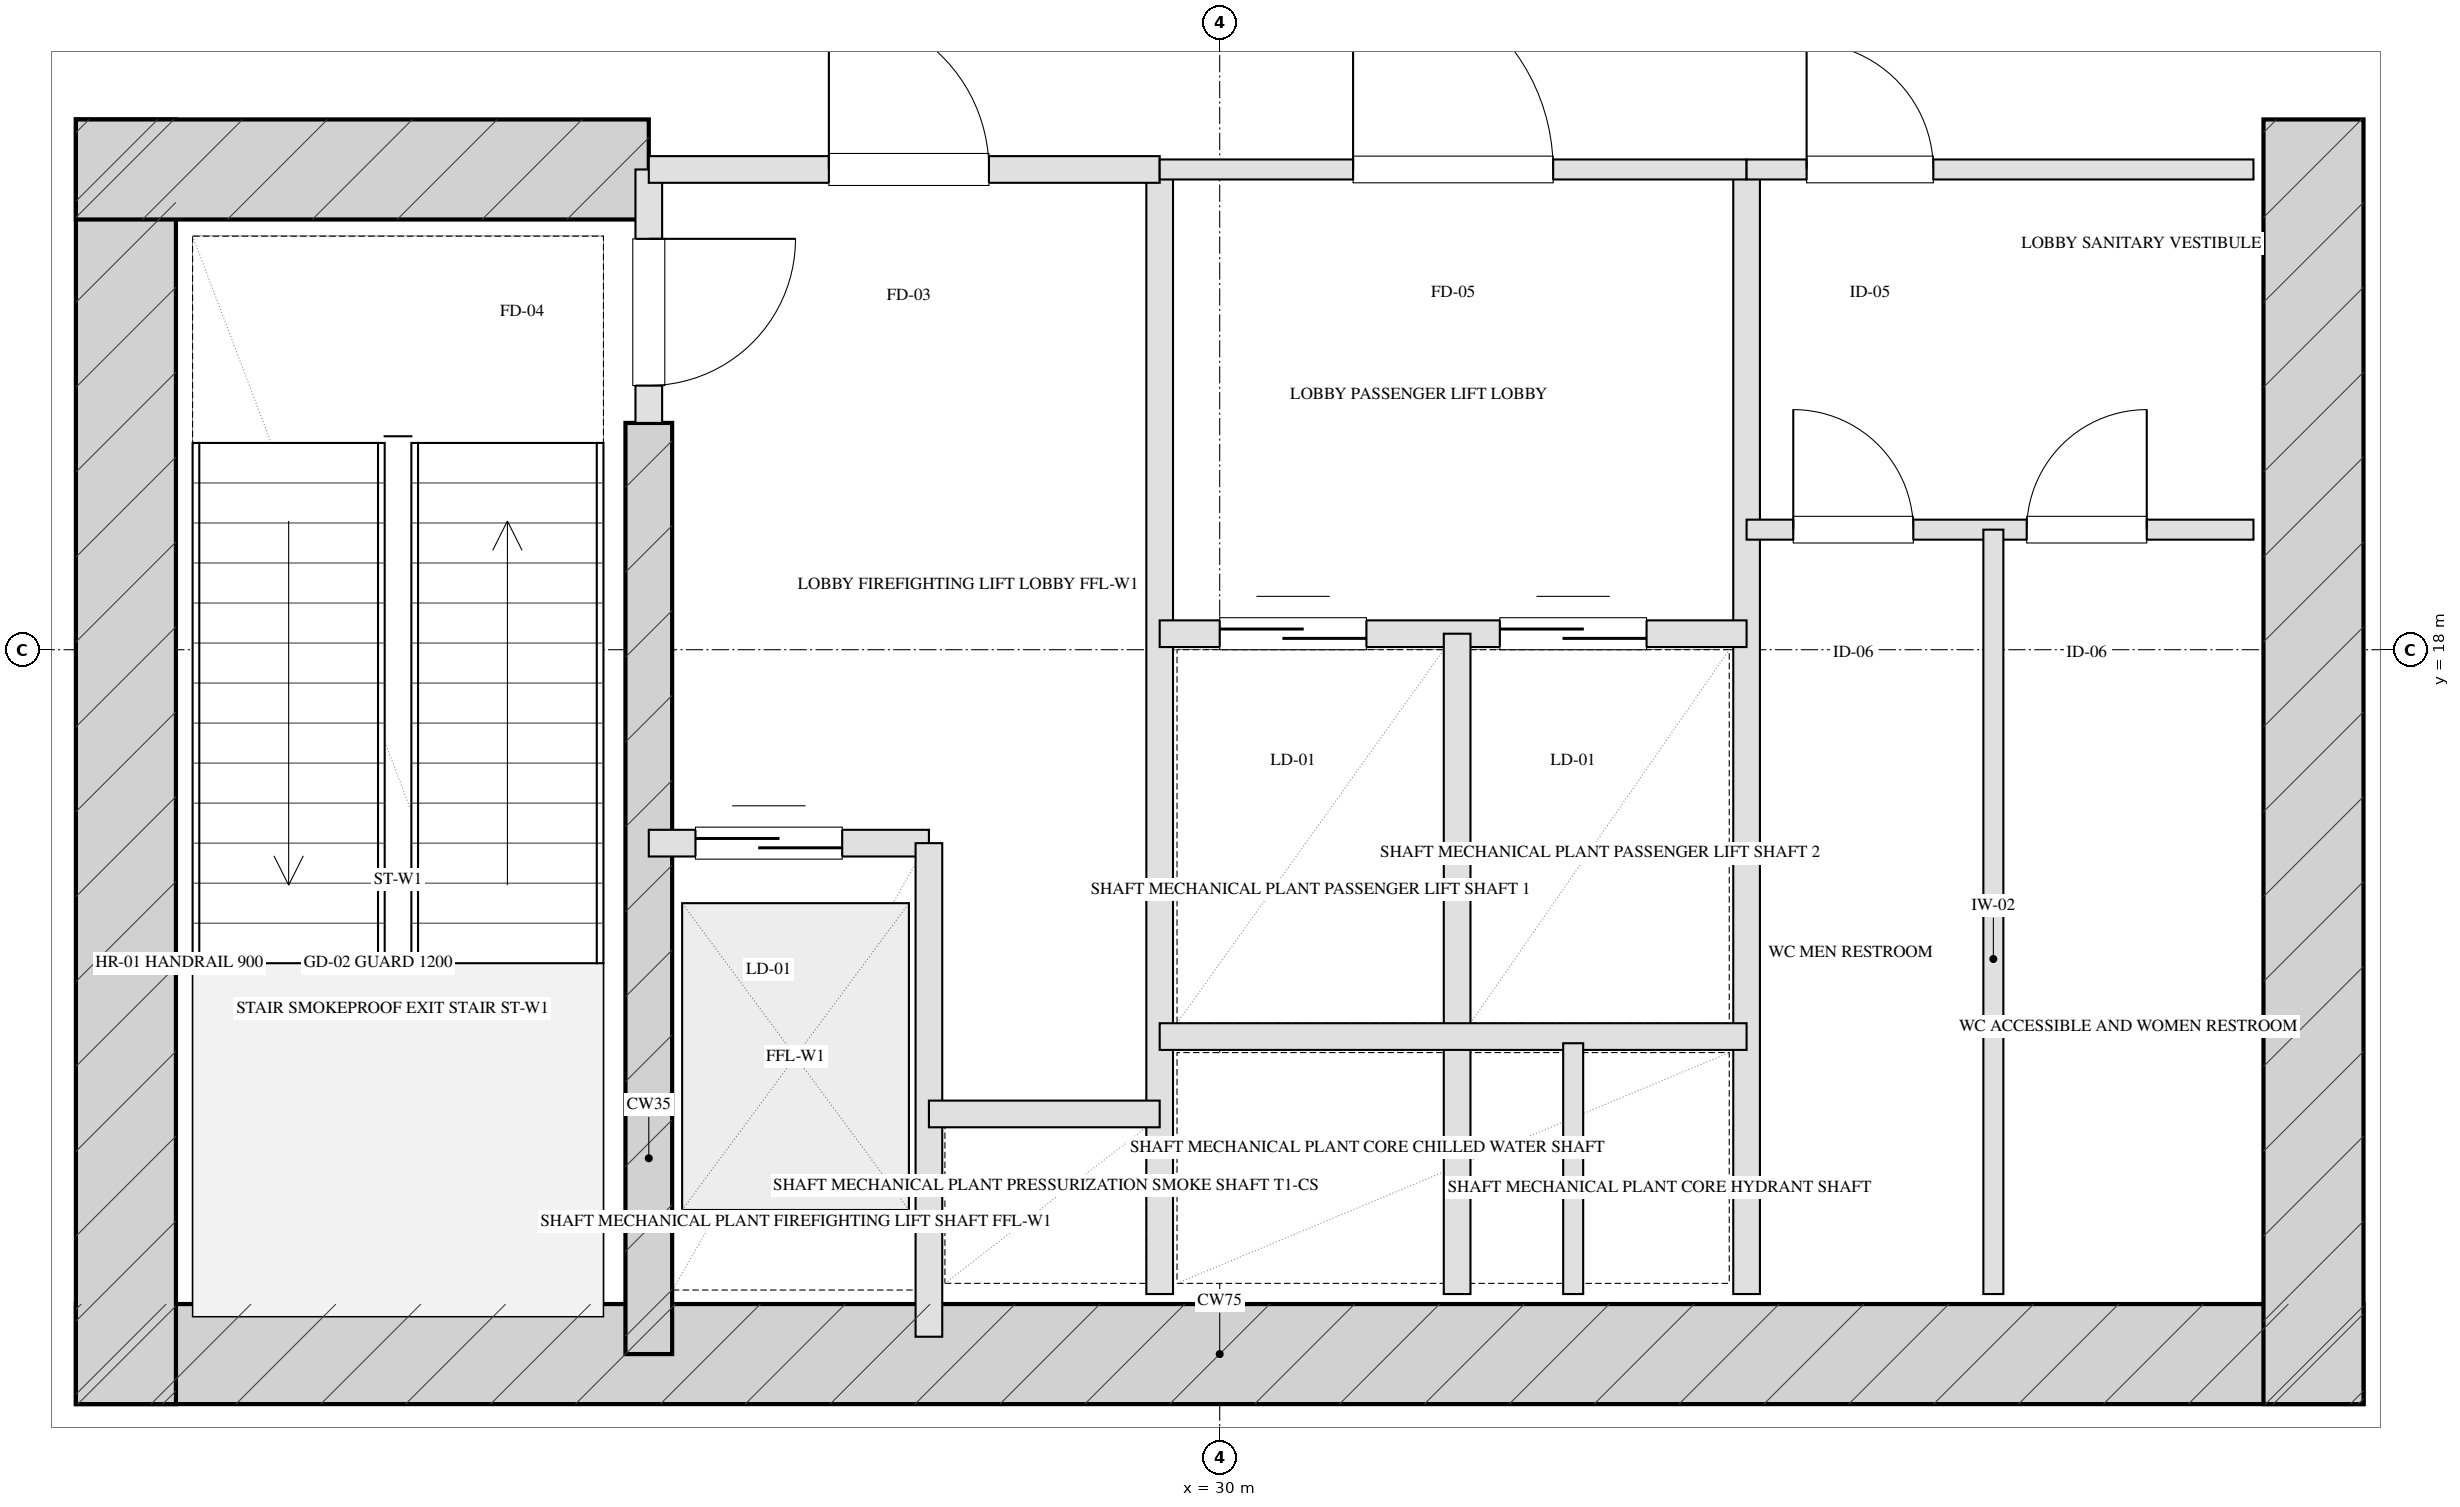
"""IFC4 building model, lengths in metres.
Left out: names, types, materials, properties, quantities, classifications, styles, units other than length and angle.
Written with IfcOpenShell. Run it as: python <this file> out.ifc"""

import sys

from ifc_helpers import new_model, si_unit, direction, frame, frame_2d, origin, place, context, subcontext, project, spatial, rectangle, extrude, element, fill, save


model = new_model("IFC4")
c1 = context("Model", 3, precision=1e-05, world=origin(), true_north=direction((0.0, 1.0)))
c2 = subcontext(c1, "Body", "Model", "MODEL_VIEW")
j1 = project(units=[si_unit("LENGTHUNIT", "METRE"), si_unit("PLANEANGLEUNIT", "RADIAN")], contexts=[c1])
p1 = place(None, origin())
s1 = spatial("IfcSite", under=j1, at=p1, CompositionType="ELEMENT")
p2 = place(p1, origin())
s2 = spatial("IfcBuilding", under=s1, at=p2, CompositionType="ELEMENT")
p3 = place(p2, frame((0.0, 0.0, 92.0)))
s3 = spatial("IfcBuildingStorey", under=s2, at=p3, CompositionType="ELEMENT", Elevation=92.0)
p4 = place(p3, frame((21.425, 12.72, 0.0), z_axis=(0.0, 0.0, 1.0), x_axis=(1.0, 0.0, 0.0)))
e1 = element("IfcWall", 1, at=p4, inside=s3, PredefinedType="SHEAR", context=c2, shape_type="SweptSolid", body=[
    extrude(rectangle(XDim=17.15, YDim=0.75, at=frame_2d((8.575, 0.0))), origin(), (0.0, 0.0, 1.0), 4.6),
])
for number, where, z_axis, x_axis in (
    (2, (21.8, 21.975, 0.0), (0.0, 0.0, 1.0), (0.0, -1.0, 0.0)),
    (3, (38.2, 21.975, 0.0), (0.0, 0.0, 1.0), (0.0, -1.0, 0.0)),
):
    element("IfcWall", number, at=place(p3, frame(where, z_axis=z_axis, x_axis=x_axis)), inside=s3, PredefinedType="SHEAR", context=c2, shape_type="SweptSolid", body=[
        extrude(rectangle(XDim=9.63, YDim=0.75, at=frame_2d((4.815, 0.0))), origin(), (0.0, 0.0, 1.0), 4.6),
    ])
p5 = place(p3, frame((25.72, 19.7, 0.0), z_axis=(0.0, 0.0, 1.0), x_axis=(0.0, -1.0, 0.0)))
e4 = element("IfcWall", 4, at=p5, inside=s3, PredefinedType="SHEAR", context=c2, shape_type="SweptSolid", body=[
    extrude(rectangle(XDim=6.98, YDim=0.35, at=frame_2d((3.49, 0.0))), origin(), (0.0, 0.0, 1.0), 4.6),
])
p6 = place(p3, frame((21.425, 21.6, 0.0), z_axis=(0.0, 0.0, 1.0), x_axis=(1.0, 0.0, 0.0)))
e5 = element("IfcWall", 5, at=p6, inside=s3, PredefinedType="SHEAR", context=c2, shape_type="SweptSolid", body=[
    extrude(rectangle(XDim=4.295, YDim=0.75, at=frame_2d((2.147, 0.0))), origin(), (0.0, 0.0, 1.0), 4.6),
])
p7 = place(p3, frame((25.72, 21.6, 0.0), z_axis=(0.0, 0.0, 1.0), x_axis=(0.0, -1.0, 0.0)))
e6 = element("IfcWall", 6, at=p7, inside=s3, PredefinedType="PARTITIONING", context=c2, shape_type="SweptSolid", body=[
    extrude(rectangle(XDim=1.9, YDim=0.2, at=frame_2d((0.95, 0.0))), origin(), (0.0, 0.0, 1.0), 4.305),
])
p8 = place(p7, frame((0.52, 0.0, 0.0)))
e7 = element("IfcOpeningElement", 7, at=p8, cuts=e6, PredefinedType="OPENING", context=c2, shape_type="SweptSolid", body=[
    extrude(rectangle(XDim=1.1, YDim=2.05, at=frame_2d((0.55, 1.025))), frame((0.0, 0.11, 0.0), z_axis=(0.0, -1.0, 0.0), x_axis=(1.0, 0.0, 0.0)), (0.0, 0.0, 1.0), 0.22),
])
p9 = place(p3, frame((29.55, 21.6, 0.0), z_axis=(0.0, 0.0, 1.0), x_axis=(0.0, -1.0, 0.0)))
e8 = element("IfcWall", 8, at=p9, inside=s3, PredefinedType="PARTITIONING", context=c2, shape_type="SweptSolid", body=[
    extrude(rectangle(XDim=8.43, YDim=0.2, at=frame_2d((4.215, 0.0))), origin(), (0.0, 0.0, 1.0), 4.305),
])
p10 = place(p3, frame((25.72, 21.6, 0.0), z_axis=(0.0, 0.0, 1.0), x_axis=(1.0, 0.0, 0.0)))
e9 = element("IfcWall", 9, at=p10, inside=s3, PredefinedType="PARTITIONING", context=c2, shape_type="SweptSolid", body=[
    extrude(rectangle(XDim=3.83, YDim=0.2, at=frame_2d((1.915, 0.0))), origin(), (0.0, 0.0, 1.0), 4.305),
])
p11 = place(p10, frame((1.35, 0.0, 0.0)))
e10 = element("IfcOpeningElement", 10, at=p11, cuts=e9, PredefinedType="OPENING", context=c2, shape_type="SweptSolid", body=[
    extrude(rectangle(XDim=1.2, YDim=2.05, at=frame_2d((0.6, 1.025))), frame((0.0, 0.11, 0.0), z_axis=(0.0, -1.0, 0.0), x_axis=(1.0, 0.0, 0.0)), (0.0, 0.0, 1.0), 0.22),
])
p12 = place(p3, frame((25.72, 16.55, 0.0), z_axis=(0.0, 0.0, 1.0), x_axis=(1.0, 0.0, 0.0)))
e11 = element("IfcWall", 11, at=p12, inside=s3, PredefinedType="PARTITIONING", context=c2, shape_type="SweptSolid", body=[
    extrude(rectangle(XDim=2.1, YDim=0.2, at=frame_2d((1.05, 0.0))), origin(), (0.0, 0.0, 1.0), 4.305),
])
p13 = place(p12, frame((0.35, 0.0, 0.0)))
e12 = element("IfcOpeningElement", 12, at=p13, cuts=e11, PredefinedType="OPENING", context=c2, shape_type="SweptSolid", body=[
    extrude(rectangle(XDim=1.1, YDim=2.05, at=frame_2d((0.55, 1.025))), frame((0.0, 0.11, 0.0), z_axis=(0.0, -1.0, 0.0), x_axis=(1.0, 0.0, 0.0)), (0.0, 0.0, 1.0), 0.22),
])
p14 = place(p3, frame((27.82, 16.55, 0.0), z_axis=(0.0, 0.0, 1.0), x_axis=(0.0, -1.0, 0.0)))
e13 = element("IfcWall", 13, at=p14, inside=s3, PredefinedType="PARTITIONING", context=c2, shape_type="SweptSolid", body=[
    extrude(rectangle(XDim=3.7, YDim=0.2, at=frame_2d((1.85, 0.0))), origin(), (0.0, 0.0, 1.0), 4.305),
])
p15 = place(p3, frame((27.82, 14.52, 0.0), z_axis=(0.0, 0.0, 1.0), x_axis=(1.0, 0.0, 0.0)))
e14 = element("IfcWall", 14, at=p15, inside=s3, PredefinedType="PARTITIONING", context=c2, shape_type="SweptSolid", body=[
    extrude(rectangle(XDim=1.73, YDim=0.2, at=frame_2d((0.865, 0.0))), origin(), (0.0, 0.0, 1.0), 4.305),
])
p16 = place(p3, frame((33.95, 21.6, 0.0), z_axis=(0.0, 0.0, 1.0), x_axis=(0.0, -1.0, 0.0)))
e15 = element("IfcWall", 15, at=p16, inside=s3, PredefinedType="PARTITIONING", context=c2, shape_type="SweptSolid", body=[
    extrude(rectangle(XDim=8.43, YDim=0.2, at=frame_2d((4.215, 0.0))), origin(), (0.0, 0.0, 1.0), 4.305),
])
p17 = place(p3, frame((29.55, 21.6, 0.0), z_axis=(0.0, 0.0, 1.0), x_axis=(1.0, 0.0, 0.0)))
e16 = element("IfcWall", 16, at=p17, inside=s3, PredefinedType="PARTITIONING", context=c2, shape_type="SweptSolid", body=[
    extrude(rectangle(XDim=4.4, YDim=0.15, at=frame_2d((2.2, 0.0))), origin(), (0.0, 0.0, 1.0), 4.305),
])
p18 = place(p17, frame((1.45, 0.0, 0.0)))
e17 = element("IfcOpeningElement", 17, at=p18, cuts=e16, PredefinedType="OPENING", context=c2, shape_type="SweptSolid", body=[
    extrude(rectangle(XDim=1.5, YDim=2.05, at=frame_2d((0.75, 1.025))), frame((0.0, 0.085, 0.0), z_axis=(0.0, -1.0, 0.0), x_axis=(1.0, 0.0, 0.0)), (0.0, 0.0, 1.0), 0.17),
])
p19 = place(p3, frame((29.55, 18.12, 0.0), z_axis=(0.0, 0.0, 1.0), x_axis=(1.0, 0.0, 0.0)))
e18 = element("IfcWall", 18, at=p19, inside=s3, PredefinedType="PARTITIONING", context=c2, shape_type="SweptSolid", body=[
    extrude(rectangle(XDim=4.4, YDim=0.2, at=frame_2d((2.2, 0.0))), origin(), (0.0, 0.0, 1.0), 4.305),
])
p20 = place(p19, frame((0.45, 0.0, 0.0)))
e19 = element("IfcOpeningElement", 19, at=p20, cuts=e18, PredefinedType="OPENING", context=c2, shape_type="SweptSolid", body=[
    extrude(rectangle(XDim=1.1, YDim=2.05, at=frame_2d((0.55, 1.025))), frame((0.0, 0.11, 0.0), z_axis=(0.0, -1.0, 0.0), x_axis=(1.0, 0.0, 0.0)), (0.0, 0.0, 1.0), 0.22),
])
p21 = place(p19, frame((2.55, 0.0, 0.0)))
e20 = element("IfcOpeningElement", 20, at=p21, cuts=e18, PredefinedType="OPENING", context=c2, shape_type="SweptSolid", body=[
    extrude(rectangle(XDim=1.1, YDim=2.05, at=frame_2d((0.55, 1.025))), frame((0.0, 0.11, 0.0), z_axis=(0.0, -1.0, 0.0), x_axis=(1.0, 0.0, 0.0)), (0.0, 0.0, 1.0), 0.22),
])
p22 = place(p3, frame((31.78, 18.12, 0.0), z_axis=(0.0, 0.0, 1.0), x_axis=(0.0, -1.0, 0.0)))
e21 = element("IfcWall", 21, at=p22, inside=s3, PredefinedType="PARTITIONING", context=c2, shape_type="SweptSolid", body=[
    extrude(rectangle(XDim=4.95, YDim=0.2, at=frame_2d((2.475, 0.0))), origin(), (0.0, 0.0, 1.0), 4.305),
])
p23 = place(p3, frame((29.55, 15.1, 0.0), z_axis=(0.0, 0.0, 1.0), x_axis=(1.0, 0.0, 0.0)))
e22 = element("IfcWall", 22, at=p23, inside=s3, PredefinedType="PARTITIONING", context=c2, shape_type="SweptSolid", body=[
    extrude(rectangle(XDim=4.4, YDim=0.2, at=frame_2d((2.2, 0.0))), origin(), (0.0, 0.0, 1.0), 4.305),
])
p24 = place(p3, frame((32.65, 15.05, 0.0), z_axis=(0.0, 0.0, 1.0), x_axis=(0.0, -1.0, 0.0)))
e23 = element("IfcWall", 23, at=p24, inside=s3, PredefinedType="PARTITIONING", context=c2, shape_type="SweptSolid", body=[
    extrude(rectangle(XDim=1.88, YDim=0.15, at=frame_2d((0.94, 0.0))), origin(), (0.0, 0.0, 1.0), 4.305),
])
p25 = place(p3, frame((33.95, 21.6, 0.0), z_axis=(0.0, 0.0, 1.0), x_axis=(1.0, 0.0, 0.0)))
e24 = element("IfcWall", 24, at=p25, inside=s3, PredefinedType="PARTITIONING", context=c2, shape_type="SweptSolid", body=[
    extrude(rectangle(XDim=3.8, YDim=0.15, at=frame_2d((1.9, 0.0))), origin(), (0.0, 0.0, 1.0), 4.305),
])
p26 = place(p25, frame((0.45, 0.0, 0.0)))
e25 = element("IfcOpeningElement", 25, at=p26, cuts=e24, PredefinedType="OPENING", context=c2, shape_type="SweptSolid", body=[
    extrude(rectangle(XDim=0.95, YDim=2.05, at=frame_2d((0.475, 1.025))), frame((0.0, 0.085, 0.0), z_axis=(0.0, -1.0, 0.0), x_axis=(1.0, 0.0, 0.0)), (0.0, 0.0, 1.0), 0.17),
])
p27 = place(p3, frame((33.95, 18.9, 0.0), z_axis=(0.0, 0.0, 1.0), x_axis=(1.0, 0.0, 0.0)))
e26 = element("IfcWall", 26, at=p27, inside=s3, PredefinedType="PARTITIONING", context=c2, shape_type="SweptSolid", body=[
    extrude(rectangle(XDim=3.8, YDim=0.15, at=frame_2d((1.9, 0.0))), origin(), (0.0, 0.0, 1.0), 4.305),
])
p28 = place(p27, frame((0.35, 0.0, 0.0)))
e27 = element("IfcOpeningElement", 27, at=p28, cuts=e26, PredefinedType="OPENING", context=c2, shape_type="SweptSolid", body=[
    extrude(rectangle(XDim=0.9, YDim=2.05, at=frame_2d((0.45, 1.025))), frame((0.0, 0.085, 0.0), z_axis=(0.0, -1.0, 0.0), x_axis=(1.0, 0.0, 0.0)), (0.0, 0.0, 1.0), 0.17),
])
p29 = place(p27, frame((2.1, 0.0, 0.0)))
e28 = element("IfcOpeningElement", 28, at=p29, cuts=e26, PredefinedType="OPENING", context=c2, shape_type="SweptSolid", body=[
    extrude(rectangle(XDim=0.9, YDim=2.05, at=frame_2d((0.45, 1.025))), frame((0.0, 0.085, 0.0), z_axis=(0.0, -1.0, 0.0), x_axis=(1.0, 0.0, 0.0)), (0.0, 0.0, 1.0), 0.17),
])
p30 = place(p3, frame((35.8, 18.9, 0.0), z_axis=(0.0, 0.0, 1.0), x_axis=(0.0, -1.0, 0.0)))
e29 = element("IfcWall", 29, at=p30, inside=s3, PredefinedType="PARTITIONING", context=c2, shape_type="SweptSolid", body=[
    extrude(rectangle(XDim=5.73, YDim=0.15, at=frame_2d((2.865, 0.0))), origin(), (0.0, 0.0, 1.0), 4.305),
])
p31 = place(p8, origin())
e30 = element("IfcDoor", 30, at=p31, inside=s3, OperationType="SINGLE_SWING_LEFT", PredefinedType="DOOR", context=c2, shape_type="SweptSolid", body=[
    extrude(rectangle(XDim=1.1, YDim=2.05, at=frame_2d((0.55, 1.025))), frame((0.0, 0.025, 0.0), z_axis=(0.0, -1.0, 0.0), x_axis=(1.0, 0.0, 0.0)), (0.0, 0.0, 1.0), 0.05),
])
fill(e7, e30)
p32 = place(p11, origin())
e31 = element("IfcDoor", 31, at=p32, inside=s3, OperationType="SINGLE_SWING_LEFT", PredefinedType="DOOR", context=c2, shape_type="SweptSolid", body=[
    extrude(rectangle(XDim=1.2, YDim=2.05, at=frame_2d((0.6, 1.025))), frame((0.0, 0.025, 0.0), z_axis=(0.0, -1.0, 0.0), x_axis=(1.0, 0.0, 0.0)), (0.0, 0.0, 1.0), 0.05),
])
fill(e10, e31)
p33 = place(p13, origin())
e32 = element("IfcDoor", 32, at=p33, inside=s3, OperationType="DOUBLE_DOOR_SLIDING", PredefinedType="DOOR", context=c2, shape_type="SweptSolid", body=[
    extrude(rectangle(XDim=1.1, YDim=2.05, at=frame_2d((0.55, 1.025))), frame((0.0, 0.025, 0.0), z_axis=(0.0, -1.0, 0.0), x_axis=(1.0, 0.0, 0.0)), (0.0, 0.0, 1.0), 0.05),
])
fill(e12, e32)
p34 = place(p18, origin())
e33 = element("IfcDoor", 33, at=p34, inside=s3, OperationType="SINGLE_SWING_LEFT", PredefinedType="DOOR", context=c2, shape_type="SweptSolid", body=[
    extrude(rectangle(XDim=1.5, YDim=2.05, at=frame_2d((0.75, 1.025))), frame((0.0, 0.025, 0.0), z_axis=(0.0, -1.0, 0.0), x_axis=(1.0, 0.0, 0.0)), (0.0, 0.0, 1.0), 0.05),
])
fill(e17, e33)
p35 = place(p20, origin())
e34 = element("IfcDoor", 34, at=p35, inside=s3, OperationType="DOUBLE_DOOR_SLIDING", PredefinedType="DOOR", context=c2, shape_type="SweptSolid", body=[
    extrude(rectangle(XDim=1.1, YDim=2.05, at=frame_2d((0.55, 1.025))), frame((0.0, 0.025, 0.0), z_axis=(0.0, -1.0, 0.0), x_axis=(1.0, 0.0, 0.0)), (0.0, 0.0, 1.0), 0.05),
])
fill(e19, e34)
p36 = place(p21, origin())
e35 = element("IfcDoor", 35, at=p36, inside=s3, OperationType="DOUBLE_DOOR_SLIDING", PredefinedType="DOOR", context=c2, shape_type="SweptSolid", body=[
    extrude(rectangle(XDim=1.1, YDim=2.05, at=frame_2d((0.55, 1.025))), frame((0.0, 0.025, 0.0), z_axis=(0.0, -1.0, 0.0), x_axis=(1.0, 0.0, 0.0)), (0.0, 0.0, 1.0), 0.05),
])
fill(e20, e35)
p37 = place(p26, origin())
e36 = element("IfcDoor", 36, at=p37, inside=s3, OperationType="SINGLE_SWING_LEFT", PredefinedType="DOOR", context=c2, shape_type="SweptSolid", body=[
    extrude(rectangle(XDim=0.95, YDim=2.05, at=frame_2d((0.475, 1.025))), frame((0.0, 0.025, 0.0), z_axis=(0.0, -1.0, 0.0), x_axis=(1.0, 0.0, 0.0)), (0.0, 0.0, 1.0), 0.05),
])
fill(e25, e36)
p38 = place(p28, origin())
e37 = element("IfcDoor", 37, at=p38, inside=s3, OperationType="SINGLE_SWING_LEFT", PredefinedType="DOOR", context=c2, shape_type="SweptSolid", body=[
    extrude(rectangle(XDim=0.9, YDim=2.05, at=frame_2d((0.45, 1.025))), frame((0.0, 0.025, 0.0), z_axis=(0.0, -1.0, 0.0), x_axis=(1.0, 0.0, 0.0)), (0.0, 0.0, 1.0), 0.05),
])
fill(e27, e37)
p39 = place(p29, origin())
e38 = element("IfcDoor", 38, at=p39, inside=s3, OperationType="SINGLE_SWING_RIGHT", PredefinedType="DOOR", context=c2, shape_type="SweptSolid", body=[
    extrude(rectangle(XDim=0.9, YDim=2.05, at=frame_2d((0.45, 1.025))), frame((0.0, 0.025, 0.0), z_axis=(0.0, -1.0, 0.0), x_axis=(1.0, 0.0, 0.0)), (0.0, 0.0, 1.0), 0.05),
])
fill(e28, e38)
save(model, sys.argv[1])
